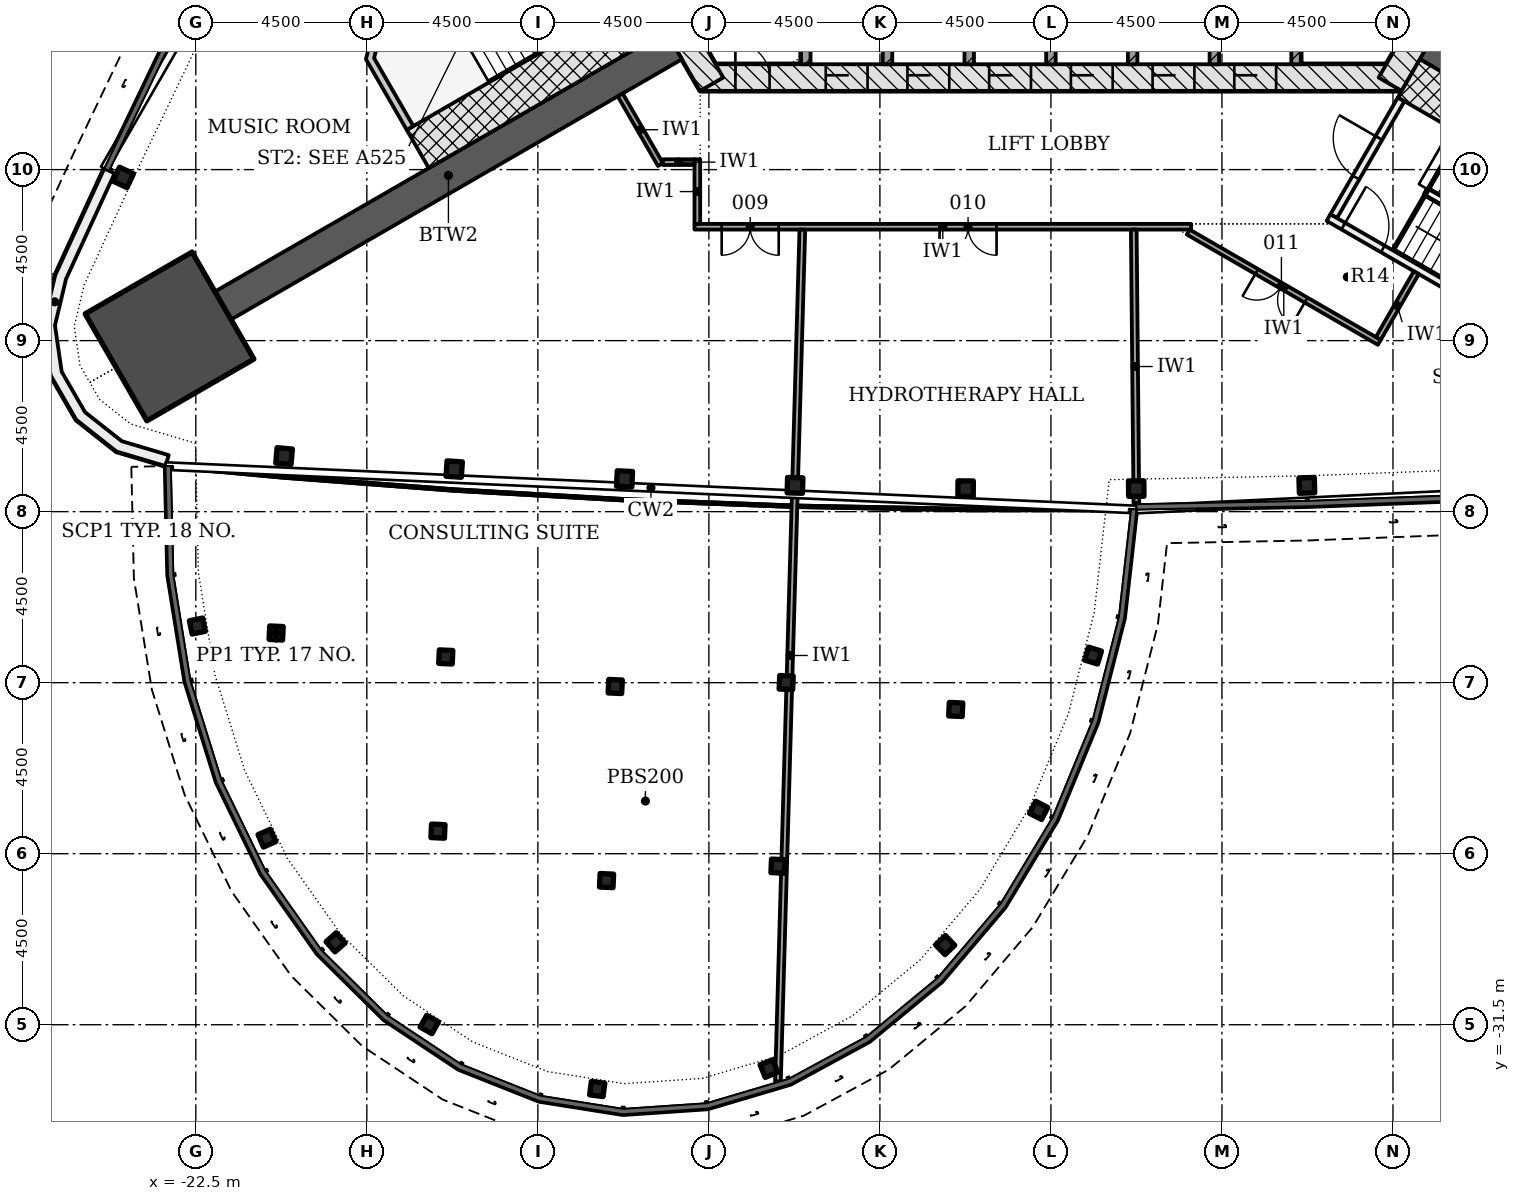
"""IFC4 building model, lengths in metres.
Left out: names, types, materials, properties, quantities, classifications, styles, units other than length and angle.
Written with IfcOpenShell. Run it as: python <this file> out.ifc"""

import sys

from ifc_helpers import new_model, si_unit, direction, frame, frame_2d, origin, origin_2d, place, context, subcontext, project, spatial, polyline, rectangle, hollow_rectangle, i_section, outline, extrude, element, fill, save


model = new_model("IFC4")
c1 = context("Model", 3, precision=1e-05, world=origin(), true_north=direction((0.0, 1.0)))
c2 = subcontext(c1, "Body", "Model", "MODEL_VIEW")
j1 = project(units=[si_unit("LENGTHUNIT", "METRE"), si_unit("PLANEANGLEUNIT", "RADIAN")], contexts=[c1])
p1 = place(None, origin())
s1 = spatial("IfcSite", under=j1, at=p1, CompositionType="ELEMENT")
p2 = place(p1, origin())
s2 = spatial("IfcBuilding", under=s1, at=p2, CompositionType="ELEMENT")
p3 = place(p2, frame((0.0, 0.0, 58.2)))
s3 = spatial("IfcBuildingStorey", under=s2, at=p3, CompositionType="ELEMENT", Elevation=58.2)
p4 = place(p3, frame((-9.229, -6.578, -0.2), z_axis=(0.0, 0.0, 1.0), x_axis=(1.0, 0.0, 0.0)))
e1 = element("IfcWall", 1, at=p4, inside=s3, PredefinedType="SHEAR", context=c2, shape_type="SweptSolid", body=[
    extrude(rectangle(XDim=18.458, YDim=0.7, at=frame_2d((9.229, 0.0))), origin(), (0.0, 0.0, 1.0), 3.6),
])
p5 = place(p4, frame((3.304, 0.0, 0.2)))
e2 = element("IfcOpeningElement", 2, at=p5, cuts=e1, PredefinedType="OPENING", context=c2, shape_type="SweptSolid", body=[
    extrude(rectangle(XDim=1.1, YDim=2.1, at=frame_2d((0.55, 1.05))), frame((0.0, 0.36, 0.0), z_axis=(0.0, -1.0, 0.0), x_axis=(1.0, 0.0, 0.0)), (0.0, 0.0, 1.0), 0.72),
])
p6 = place(p4, frame((5.454, 0.0, 0.2)))
e3 = element("IfcOpeningElement", 3, at=p6, cuts=e1, PredefinedType="OPENING", context=c2, shape_type="SweptSolid", body=[
    extrude(rectangle(XDim=1.1, YDim=2.1, at=frame_2d((0.55, 1.05))), frame((0.0, 0.36, 0.0), z_axis=(0.0, -1.0, 0.0), x_axis=(1.0, 0.0, 0.0)), (0.0, 0.0, 1.0), 0.72),
])
p7 = place(p4, frame((7.604, 0.0, 0.2)))
e4 = element("IfcOpeningElement", 4, at=p7, cuts=e1, PredefinedType="OPENING", context=c2, shape_type="SweptSolid", body=[
    extrude(rectangle(XDim=1.1, YDim=2.1, at=frame_2d((0.55, 1.05))), frame((0.0, 0.36, 0.0), z_axis=(0.0, -1.0, 0.0), x_axis=(1.0, 0.0, 0.0)), (0.0, 0.0, 1.0), 0.72),
])
p8 = place(p4, frame((9.754, 0.0, 0.2)))
e5 = element("IfcOpeningElement", 5, at=p8, cuts=e1, PredefinedType="OPENING", context=c2, shape_type="SweptSolid", body=[
    extrude(rectangle(XDim=1.1, YDim=2.1, at=frame_2d((0.55, 1.05))), frame((0.0, 0.36, 0.0), z_axis=(0.0, -1.0, 0.0), x_axis=(1.0, 0.0, 0.0)), (0.0, 0.0, 1.0), 0.72),
])
p9 = place(p4, frame((11.904, 0.0, 0.2)))
e6 = element("IfcOpeningElement", 6, at=p9, cuts=e1, PredefinedType="OPENING", context=c2, shape_type="SweptSolid", body=[
    extrude(rectangle(XDim=1.1, YDim=2.1, at=frame_2d((0.55, 1.05))), frame((0.0, 0.36, 0.0), z_axis=(0.0, -1.0, 0.0), x_axis=(1.0, 0.0, 0.0)), (0.0, 0.0, 1.0), 0.72),
])
p10 = place(p4, frame((14.054, 0.0, 0.2)))
e7 = element("IfcOpeningElement", 7, at=p10, cuts=e1, PredefinedType="OPENING", context=c2, shape_type="SweptSolid", body=[
    extrude(rectangle(XDim=1.1, YDim=2.1, at=frame_2d((0.55, 1.05))), frame((0.0, 0.36, 0.0), z_axis=(0.0, -1.0, 0.0), x_axis=(1.0, 0.0, 0.0)), (0.0, 0.0, 1.0), 0.72),
])
p11 = place(p4, frame((0.926, 0.0, 0.2)))
e8 = element("IfcOpeningElement", 8, at=p11, cuts=e1, PredefinedType="OPENING", context=c2, shape_type="SweptSolid", body=[
    extrude(rectangle(XDim=0.9, YDim=2.1, at=frame_2d((0.45, 1.05))), frame((0.0, 0.36, 0.0), z_axis=(0.0, -1.0, 0.0), x_axis=(1.0, 0.0, 0.0)), (0.0, 0.0, 1.0), 0.72),
])
for number, where, z_axis, x_axis in (
    (9, (8.926, -6.753, -0.2), (0.0, 0.0, 1.0), (0.5, 0.866, 0.0)),
    (10, (-10.311, -4.353, -0.2), (0.0, 0.0, 1.0), (0.5, -0.866, 0.0)),
):
    element("IfcWall", number, at=place(p3, frame(where, z_axis=z_axis, x_axis=x_axis)), inside=s3, PredefinedType="SHEAR", context=c2, shape_type="SweptSolid", body=[
        extrude(rectangle(XDim=2.771, YDim=0.7, at=frame_2d((1.386, 0.0))), origin(), (0.0, 0.0, 1.0), 3.6),
    ])
for number, where, z_axis, x_axis in (
    (11, (-9.922, -5.728, -0.2), (0.0, 0.0, 1.0), (-0.866, -0.5, 0.0)),
    (12, (9.922, -5.728, -0.2), (0.0, 0.0, 1.0), (0.866, -0.5, 0.0)),
):
    element("IfcWall", number, at=place(p3, frame(where, z_axis=z_axis, x_axis=x_axis)), inside=s3, PredefinedType="SHEAR", context=c2, shape_type="SweptSolid", body=[
        extrude(rectangle(XDim=13.698, YDim=0.85, at=frame_2d((6.849, 0.0))), origin(), (0.0, 0.0, 1.0), 3.6),
    ])
p12 = place(p3, frame((-23.192, -13.39, -0.2), z_axis=(0.0, 0.0, 1.0), x_axis=(-0.866025403784, -0.5, 0.0)))
e13 = element("IfcColumn", 13, at=p12, inside=s3, PredefinedType="COLUMN", context=c2, shape_type="SweptSolid", body=[
    extrude(rectangle(XDim=3.25, YDim=3.25, at=origin_2d()), origin(), (0.0, 0.0, 1.0), 3.6),
])
for number, where, z_axis, x_axis in (
    (14, (-24.411, -9.206, -0.2), (0.0, 0.0, 1.0), (-0.424, -0.906, 0.0)),
    (15, (-20.178, -16.537, -0.2), (0.0, 0.0, 1.0), (0.996, -0.086, 0.0)),
    (16, (-15.702, -16.88, -0.2), (0.0, 0.0, 1.0), (0.998, -0.067, 0.0)),
    (17, (-11.219, -17.137, -0.2), (0.0, 0.0, 1.0), (0.999, -0.048, 0.0)),
    (18, (-6.733, -17.308, -0.2), (0.0, 0.0, 1.0), (1.0, -0.029, 0.0)),
    (19, (-2.245, -17.394, -0.2), (0.0, 0.0, 1.0), (1.0, -0.01, 0.0)),
    (20, (2.245, -17.394, -0.2), (0.0, 0.0, 1.0), (1.0, 0.01, 0.0)),
    (21, (6.733, -17.308, -0.2), (0.0, 0.0, 1.0), (1.0, 0.029, 0.0)),
):
    element("IfcColumn", number, at=place(p3, frame(where, z_axis=z_axis, x_axis=x_axis)), inside=s3, PredefinedType="COLUMN", context=c2, shape_type="SweptSolid", body=[
        extrude(i_section(OverallWidth=0.404, OverallDepth=0.406, WebThickness=0.027, FlangeThickness=0.044, FilletRadius=0.015, at=origin_2d()), origin(), (0.0, 0.0, 1.0), 3.6),
    ])
for number, where, z_axis, x_axis in (
    (22, (-20.386, -21.193, -0.2), (0.0, 0.0, 1.0), (-0.045, -0.999, 0.0)),
    (23, (-15.923, -21.823, -0.2), (0.0, 0.0, 1.0), (-0.045, -0.999, 0.0)),
    (24, (-16.128, -26.406, -0.2), (0.0, 0.0, 1.0), (-0.045, -0.999, 0.0)),
    (25, (-11.464, -22.6, -0.2), (0.0, 0.0, 1.0), (-0.045, -0.999, 0.0)),
    (26, (-11.693, -27.707, -0.2), (0.0, 0.0, 1.0), (-0.045, -0.999, 0.0)),
    (27, (-6.966, -22.497, -0.2), (0.0, 0.0, 1.0), (-0.045, -0.999, 0.0)),
    (28, (-7.182, -27.327, -0.2), (0.0, 0.0, 1.0), (-0.045, -0.999, 0.0)),
    (29, (-2.505, -23.205, -0.2), (0.0, 0.0, 1.0), (-0.045, -0.999, 0.0)),
    (30, (-22.458, -21.01, -0.2), (0.0, 0.0, 1.0), (0.2, -0.98, 0.0)),
    (31, (-20.628, -26.591, -0.2), (0.0, 0.0, 1.0), (0.4, -0.916, 0.0)),
    (32, (-18.821, -29.332, -0.2), (0.0, 0.0, 1.0), (0.657, -0.754, 0.0)),
    (33, (-16.356, -31.494, -0.2), (0.0, 0.0, 1.0), (0.872, -0.489, 0.0)),
    (34, (-11.938, -33.192, -0.2), (0.0, 0.0, 1.0), (0.992, -0.129, 0.0)),
    (35, (-7.42, -32.653, -0.2), (0.0, 0.0, 1.0), (0.924, 0.382, 0.0)),
    (36, (-2.782, -29.404, -0.2), (0.0, 0.0, 1.0), (0.722, 0.691, 0.0)),
    (37, (-0.323, -25.86, -0.2), (0.0, 0.0, 1.0), (0.455, 0.891, 0.0)),
    (38, (1.108, -21.787, -0.2), (0.0, 0.0, 1.0), (0.291, 0.957, 0.0)),
):
    element("IfcColumn", number, at=place(p3, frame(where, z_axis=z_axis, x_axis=x_axis)), inside=s3, PredefinedType="COLUMN", context=c2, shape_type="SweptSolid", body=[
        extrude(hollow_rectangle(XDim=0.356, YDim=0.356, WallThickness=0.013, at=origin_2d()), origin(), (0.0, 0.0, 1.0), 3.6),
    ])
p13 = place(p3, origin())
e39 = element("IfcWall", 39, at=p13, inside=s3, PredefinedType="NOTDEFINED", context=c2, shape_type="SweptSolid", body=[
    extrude(outline(polyline([(-24.909, -8.973), (-26.198, -11.776), (-26.511, -13.085), (-26.318, -14.417), (-25.645, -15.583), (-24.588, -16.417), (-23.297, -16.8), (-23.212, -16.513), (-24.447, -16.146), (-25.414, -15.384), (-26.029, -14.317), (-26.206, -13.099), (-25.913, -11.875), (-24.636, -9.098), (-24.909, -8.973)])), origin(), (0.0, 0.0, 1.0), 3.3),
])
for number, where, z_axis, x_axis in (
    (40, (-6.45, -6.228, -0.2), (0.0, 0.0, 1.0), (0.0, 1.0, 0.0)),
    (41, (-4.3, -6.228, -0.2), (0.0, 0.0, 1.0), (0.0, 1.0, 0.0)),
    (42, (-2.15, -6.228, -0.2), (0.0, 0.0, 1.0), (0.0, 1.0, 0.0)),
    (43, (0.0, -6.228, -0.2), (0.0, 0.0, 1.0), (0.0, 1.0, 0.0)),
    (44, (2.15, -6.228, -0.2), (0.0, 0.0, 1.0), (0.0, 1.0, 0.0)),
    (45, (4.3, -6.228, -0.2), (0.0, 0.0, 1.0), (0.0, 1.0, 0.0)),
    (46, (6.45, -6.228, -0.2), (0.0, 0.0, 1.0), (0.0, 1.0, 0.0)),
):
    element("IfcWall", number, at=place(p3, frame(where, z_axis=z_axis, x_axis=x_axis)), inside=s3, PredefinedType="PARTITIONING", context=c2, shape_type="SweptSolid", body=[
        extrude(rectangle(XDim=2.5, YDim=0.25, at=frame_2d((1.25, 0.0))), origin(), (0.0, 0.0, 1.0), 3.6),
    ])
p14 = place(p3, frame((-10.424, -4.858, -0.2), z_axis=(0.0, 0.0, 1.0), x_axis=(-0.866033125095, -0.499986626058, 0.0)))
e47 = element("IfcWall", 47, at=p14, inside=s3, PredefinedType="SHEAR", context=c2, shape_type="SweptSolid", body=[
    extrude(rectangle(XDim=7.2, YDim=1.161, at=frame_2d((3.6, 0.0))), origin(), (0.0, 0.0, 1.0), 3.6),
])
p15 = place(p3, frame((0.0, 0.0, -0.2)))
e48 = element("IfcWall", 48, at=p15, inside=s3, PredefinedType="SHEAR", context=c2, shape_type="SweptSolid", body=[
    extrude(outline(polyline([(-17.439, -3.907), (-18.025, -6.093), (-16.95, -7.955), (-16.777, -7.855), (-17.81, -6.065), (-17.267, -4.039), (-17.339, -4.081), (-17.339, -4.081), (-17.339, -4.081), (-17.339, -4.081), (-17.339, -4.081), (-17.339, -4.081), (-17.339, -4.081), (-17.339, -4.081), (-17.339, -4.081), (-17.339, -4.081), (-17.339, -4.081), (-17.339, -4.081), (-17.339, -4.081), (-17.339, -4.081), (-17.339, -4.081), (-17.339, -4.081), (-17.339, -4.081), (-17.439, -3.907)])), origin(), (0.0, 0.0, 1.0), 3.6),
])
p16 = place(p3, frame((7.44, -10.226, -0.2), z_axis=(0.0, 0.0, 1.0), x_axis=(0.500022077904, 0.866012656725, 0.0)))
e49 = element("IfcWall", 49, at=p16, inside=s3, PredefinedType="SHEAR", context=c2, shape_type="SweptSolid", body=[
    extrude(rectangle(XDim=3.55, YDim=0.2, at=frame_2d((1.775, 0.0))), origin(), (0.0, 0.0, 1.0), 3.6),
])
p17 = place(p16, frame((1.175, 0.0, 0.2)))
e50 = element("IfcOpeningElement", 50, at=p17, cuts=e49, PredefinedType="OPENING", context=c2, shape_type="SweptSolid", body=[
    extrude(rectangle(XDim=1.2, YDim=2.1, at=frame_2d((0.6, 1.05))), frame((0.0, 0.11, 0.0), z_axis=(0.0, -1.0, 0.0), x_axis=(1.0, 0.0, 0.0)), (0.0, 0.0, 1.0), 0.22),
])
p18 = place(p3, frame((7.304, -10.262, -0.2), z_axis=(0.0, 0.0, 1.0), x_axis=(0.866026594901, -0.49999793692, 0.0)))
e51 = element("IfcWall", 51, at=p18, inside=s3, PredefinedType="SHEAR", context=c2, shape_type="SweptSolid", body=[
    extrude(rectangle(XDim=5.6, YDim=0.2, at=frame_2d((2.8, 0.0))), origin(), (0.0, 0.0, 1.0), 3.6),
])
p19 = place(p18, frame((0.45, 0.0, 0.2)))
e52 = element("IfcOpeningElement", 52, at=p19, cuts=e51, PredefinedType="OPENING", context=c2, shape_type="SweptSolid", body=[
    extrude(rectangle(XDim=1.2, YDim=2.1, at=frame_2d((0.6, 1.05))), frame((0.0, 0.11, 0.0), z_axis=(0.0, -1.0, 0.0), x_axis=(1.0, 0.0, 0.0)), (0.0, 0.0, 1.0), 0.22),
])
p20 = place(p3, frame((9.419, -6.599, -0.2), z_axis=(0.0, 0.0, 1.0), x_axis=(0.866033125095, -0.499986626058, 0.0)))
e53 = element("IfcWall", 53, at=p20, inside=s3, PredefinedType="SHEAR", context=c2, shape_type="SweptSolid", body=[
    extrude(rectangle(XDim=7.2, YDim=1.161, at=frame_2d((3.6, 0.0))), origin(), (0.0, 0.0, 1.0), 3.6),
])
p21 = place(p3, frame((3.689, -10.503, 0.0), z_axis=(0.0, 0.0, 1.0), x_axis=(-1.0, 0.0, 0.0)))
e54 = element("IfcWall", 54, at=p21, inside=s3, PredefinedType="PARTITIONING", context=c2, shape_type="SweptSolid", body=[
    extrude(rectangle(XDim=13.068, YDim=0.15, at=frame_2d((6.534, 0.0))), origin(), (0.0, 0.0, 1.0), 2.778),
])
p22 = place(p21, frame((10.852, 0.0, 0.0)))
e55 = element("IfcOpeningElement", 55, at=p22, cuts=e54, PredefinedType="OPENING", context=c2, shape_type="SweptSolid", body=[
    extrude(rectangle(XDim=1.5, YDim=2.1, at=frame_2d((0.75, 1.05))), frame((0.0, 0.085, 0.0), z_axis=(0.0, -1.0, 0.0), x_axis=(1.0, 0.0, 0.0)), (0.0, 0.0, 1.0), 0.17),
])
p23 = place(p21, frame((5.119, 0.0, 0.0)))
e56 = element("IfcOpeningElement", 56, at=p23, cuts=e54, PredefinedType="OPENING", context=c2, shape_type="SweptSolid", body=[
    extrude(rectangle(XDim=1.5, YDim=2.1, at=frame_2d((0.75, 1.05))), frame((0.0, 0.085, 0.0), z_axis=(0.0, -1.0, 0.0), x_axis=(1.0, 0.0, 0.0)), (0.0, 0.0, 1.0), 0.17),
])
p24 = place(p3, frame((8.641, -13.546, 0.0), z_axis=(0.0, 0.0, 1.0), x_axis=(-0.866042728627, 0.499969991291, 0.0)))
e57 = element("IfcWall", 57, at=p24, inside=s3, PredefinedType="PARTITIONING", context=c2, shape_type="SweptSolid", body=[
    extrude(rectangle(XDim=5.805, YDim=0.15, at=frame_2d((2.903, 0.0))), origin(), (0.0, 0.0, 1.0), 2.778),
])
p25 = place(p24, frame((2.225, 0.0, 0.0)))
e58 = element("IfcOpeningElement", 58, at=p25, cuts=e57, PredefinedType="OPENING", context=c2, shape_type="SweptSolid", body=[
    extrude(rectangle(XDim=1.5, YDim=2.1, at=frame_2d((0.75, 1.05))), frame((0.0, 0.085, 0.0), z_axis=(0.0, -1.0, 0.0), x_axis=(1.0, 0.0, 0.0)), (0.0, 0.0, 1.0), 0.17),
])
p26 = place(p3, frame((8.614, -13.444, 0.0), z_axis=(0.0, 0.0, 1.0), x_axis=(0.499972520799, 0.866041268327, 0.0)))
e59 = element("IfcWall", 59, at=p26, inside=s3, PredefinedType="PARTITIONING", context=c2, shape_type="SweptSolid", body=[
    extrude(rectangle(XDim=2.0, YDim=0.15, at=frame_2d((1.0, 0.0))), origin(), (0.0, 0.0, 1.0), 3.4),
])
p27 = place(p3, frame((-11.333, -7.034, 0.0), z_axis=(0.0, 0.0, 1.0), x_axis=(0.499981853705, -0.866035880299, 0.0)))
e60 = element("IfcWall", 60, at=p27, inside=s3, PredefinedType="PARTITIONING", context=c2, shape_type="SweptSolid", body=[
    extrude(rectangle(XDim=2.118, YDim=0.15, at=frame_2d((1.059, 0.0))), origin(), (0.0, 0.0, 1.0), 2.778),
])
p28 = place(p3, frame((-9.304, -10.428, 0.0), z_axis=(0.0, 0.0, 1.0), x_axis=(0.0, 1.0, 0.0)))
e61 = element("IfcWall", 61, at=p28, inside=s3, PredefinedType="PARTITIONING", context=c2, shape_type="SweptSolid", body=[
    extrude(rectangle(XDim=1.7, YDim=0.15, at=frame_2d((0.85, 0.0))), origin(), (0.0, 0.0, 1.0), 3.4),
])
p29 = place(p3, frame((-10.209, -8.803, 0.0), z_axis=(0.0, 0.0, 1.0), x_axis=(1.0, 0.0, 0.0)))
e62 = element("IfcWall", 62, at=p29, inside=s3, PredefinedType="PARTITIONING", context=c2, shape_type="SweptSolid", body=[
    extrude(rectangle(XDim=0.83, YDim=0.15, at=frame_2d((0.415, 0.0))), origin(), (0.0, 0.0, 1.0), 3.4),
])
p30 = place(p3, frame((-7.183, -32.99, 0.0), z_axis=(0.0, 0.0, 1.0), x_axis=(0.028641228243, 0.999589755872, 0.0)))
e63 = element("IfcWall", 63, at=p30, inside=s3, PredefinedType="PARTITIONING", context=c2, shape_type="SweptSolid", body=[
    extrude(rectangle(XDim=22.418, YDim=0.15, at=frame_2d((11.209, 0.0))), origin(), (0.0, 0.0, 1.0), 2.778),
])
p31 = place(p3, frame((2.248, -17.784, 0.0), z_axis=(0.0, 0.0, 1.0), x_axis=(-0.009520796395, 0.999954676191, 0.0)))
e64 = element("IfcWall", 64, at=p31, inside=s3, PredefinedType="PARTITIONING", context=c2, shape_type="SweptSolid", body=[
    extrude(rectangle(XDim=7.206, YDim=0.15, at=frame_2d((3.603, 0.0))), origin(), (0.0, 0.0, 1.0), 2.778),
])
p32 = place(p5, origin())
e65 = element("IfcDoor", 65, at=p32, inside=s3, OperationType="DOUBLE_DOOR_SLIDING", PredefinedType="DOOR", context=c2, shape_type="SweptSolid", body=[
    extrude(rectangle(XDim=1.1, YDim=2.1, at=frame_2d((0.55, 1.05))), frame((0.0, 0.025, 0.0), z_axis=(0.0, -1.0, 0.0), x_axis=(1.0, 0.0, 0.0)), (0.0, 0.0, 1.0), 0.05),
])
fill(e2, e65)
p33 = place(p6, origin())
e66 = element("IfcDoor", 66, at=p33, inside=s3, OperationType="DOUBLE_DOOR_SLIDING", PredefinedType="DOOR", context=c2, shape_type="SweptSolid", body=[
    extrude(rectangle(XDim=1.1, YDim=2.1, at=frame_2d((0.55, 1.05))), frame((0.0, 0.025, 0.0), z_axis=(0.0, -1.0, 0.0), x_axis=(1.0, 0.0, 0.0)), (0.0, 0.0, 1.0), 0.05),
])
fill(e3, e66)
p34 = place(p7, origin())
e67 = element("IfcDoor", 67, at=p34, inside=s3, OperationType="DOUBLE_DOOR_SLIDING", PredefinedType="DOOR", context=c2, shape_type="SweptSolid", body=[
    extrude(rectangle(XDim=1.1, YDim=2.1, at=frame_2d((0.55, 1.05))), frame((0.0, 0.025, 0.0), z_axis=(0.0, -1.0, 0.0), x_axis=(1.0, 0.0, 0.0)), (0.0, 0.0, 1.0), 0.05),
])
fill(e4, e67)
p35 = place(p8, origin())
e68 = element("IfcDoor", 68, at=p35, inside=s3, OperationType="DOUBLE_DOOR_SLIDING", PredefinedType="DOOR", context=c2, shape_type="SweptSolid", body=[
    extrude(rectangle(XDim=1.1, YDim=2.1, at=frame_2d((0.55, 1.05))), frame((0.0, 0.025, 0.0), z_axis=(0.0, -1.0, 0.0), x_axis=(1.0, 0.0, 0.0)), (0.0, 0.0, 1.0), 0.05),
])
fill(e5, e68)
p36 = place(p9, origin())
e69 = element("IfcDoor", 69, at=p36, inside=s3, OperationType="DOUBLE_DOOR_SLIDING", PredefinedType="DOOR", context=c2, shape_type="SweptSolid", body=[
    extrude(rectangle(XDim=1.1, YDim=2.1, at=frame_2d((0.55, 1.05))), frame((0.0, 0.025, 0.0), z_axis=(0.0, -1.0, 0.0), x_axis=(1.0, 0.0, 0.0)), (0.0, 0.0, 1.0), 0.05),
])
fill(e6, e69)
p37 = place(p10, origin())
e70 = element("IfcDoor", 70, at=p37, inside=s3, OperationType="DOUBLE_DOOR_SLIDING", PredefinedType="DOOR", context=c2, shape_type="SweptSolid", body=[
    extrude(rectangle(XDim=1.1, YDim=2.1, at=frame_2d((0.55, 1.05))), frame((0.0, 0.025, 0.0), z_axis=(0.0, -1.0, 0.0), x_axis=(1.0, 0.0, 0.0)), (0.0, 0.0, 1.0), 0.05),
])
fill(e7, e70)
p38 = place(p11, origin())
e71 = element("IfcDoor", 71, at=p38, inside=s3, OperationType="SINGLE_SWING_LEFT", PredefinedType="DOOR", context=c2, shape_type="SweptSolid", body=[
    extrude(rectangle(XDim=0.9, YDim=2.1, at=frame_2d((0.45, 1.05))), frame((0.0, 0.075, 0.0), z_axis=(0.0, -1.0, 0.0), x_axis=(1.0, 0.0, 0.0)), (0.0, 0.0, 1.0), 0.15),
])
fill(e8, e71)
p39 = place(p17, origin())
e72 = element("IfcDoor", 72, at=p39, inside=s3, OperationType="SINGLE_SWING_RIGHT", PredefinedType="DOOR", context=c2, shape_type="SweptSolid", body=[
    extrude(rectangle(XDim=1.2, YDim=2.1, at=frame_2d((0.6, 1.05))), frame((0.0, 0.025, 0.0), z_axis=(0.0, -1.0, 0.0), x_axis=(1.0, 0.0, 0.0)), (0.0, 0.0, 1.0), 0.05),
])
fill(e50, e72)
p40 = place(p19, origin())
e73 = element("IfcDoor", 73, at=p40, inside=s3, OperationType="SINGLE_SWING_LEFT", PredefinedType="DOOR", context=c2, shape_type="SweptSolid", body=[
    extrude(rectangle(XDim=1.2, YDim=2.1, at=frame_2d((0.6, 1.05))), frame((0.0, 0.025, 0.0), z_axis=(0.0, -1.0, 0.0), x_axis=(1.0, 0.0, 0.0)), (0.0, 0.0, 1.0), 0.05),
])
fill(e52, e73)
p41 = place(p22, origin())
e74 = element("IfcDoor", 74, at=p41, inside=s3, OperationType="DOUBLE_DOOR_SINGLE_SWING", PredefinedType="DOOR", context=c2, shape_type="SweptSolid", body=[
    extrude(rectangle(XDim=1.5, YDim=2.1, at=frame_2d((0.75, 1.05))), frame((0.0, 0.025, 0.0), z_axis=(0.0, -1.0, 0.0), x_axis=(1.0, 0.0, 0.0)), (0.0, 0.0, 1.0), 0.05),
])
fill(e55, e74)
p42 = place(p23, origin())
e75 = element("IfcDoor", 75, at=p42, inside=s3, OperationType="DOUBLE_DOOR_SINGLE_SWING", PredefinedType="DOOR", context=c2, shape_type="SweptSolid", body=[
    extrude(rectangle(XDim=1.5, YDim=2.1, at=frame_2d((0.75, 1.05))), frame((0.0, 0.025, 0.0), z_axis=(0.0, -1.0, 0.0), x_axis=(1.0, 0.0, 0.0)), (0.0, 0.0, 1.0), 0.05),
])
fill(e56, e75)
p43 = place(p25, origin())
e76 = element("IfcDoor", 76, at=p43, inside=s3, OperationType="DOUBLE_DOOR_SINGLE_SWING", PredefinedType="DOOR", context=c2, shape_type="SweptSolid", body=[
    extrude(rectangle(XDim=1.5, YDim=2.1, at=frame_2d((0.75, 1.05))), frame((0.0, 0.025, 0.0), z_axis=(0.0, -1.0, 0.0), x_axis=(1.0, 0.0, 0.0)), (0.0, 0.0, 1.0), 0.05),
])
fill(e58, e76)
save(model, sys.argv[1])
